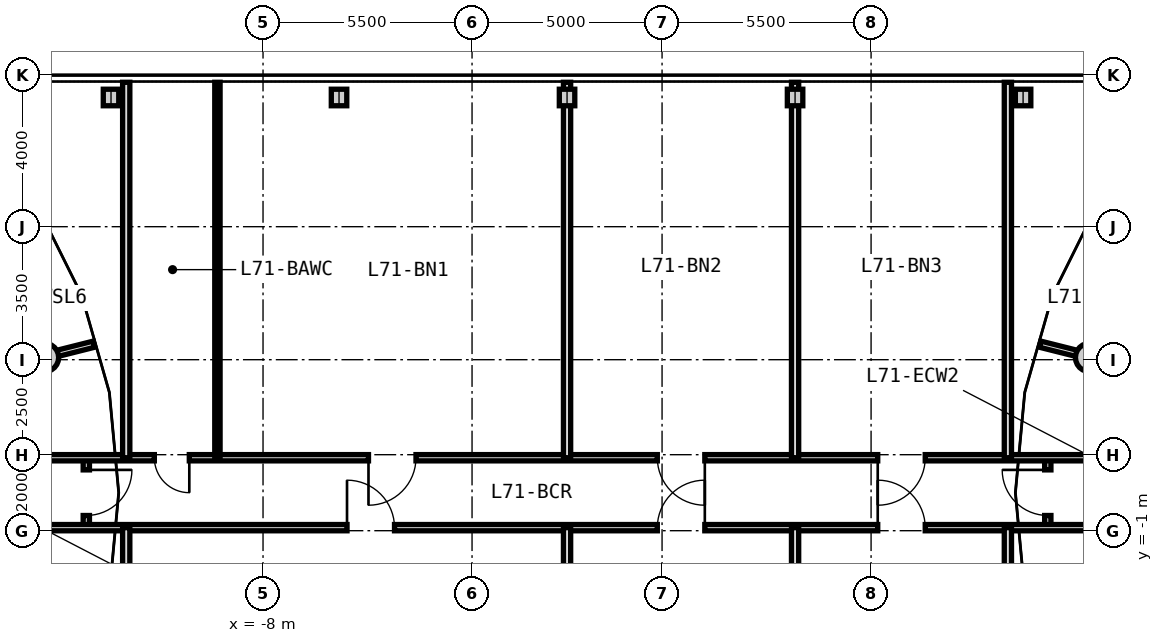
"""IFC4 building model, lengths in metres.
Left out: names, types, materials, properties, quantities, classifications, styles, units other than length and angle.
Written with IfcOpenShell. Run it as: python <this file> out.ifc"""

import sys

from ifc_helpers import new_model, si_unit, direction, frame, frame_2d, origin, origin_2d, place, context, subcontext, project, spatial, rectangle, circle, i_section, extrude, source, transform, mapped, element, fill, save


model = new_model("IFC4")
c1 = context("Model", 3, precision=1e-05, world=origin(), true_north=direction((0.0, 1.0)))
c2 = subcontext(c1, "Body", "Model", "MODEL_VIEW")
j1 = project(units=[si_unit("LENGTHUNIT", "METRE"), si_unit("PLANEANGLEUNIT", "RADIAN")], contexts=[c1])
p1 = place(None, origin())
s1 = spatial("IfcSite", under=j1, at=p1, CompositionType="ELEMENT")
p2 = place(p1, origin())
s2 = spatial("IfcBuilding", under=s1, at=p2, CompositionType="ELEMENT")
p3 = place(p2, frame((0.0, 0.0, 229.15)))
s3 = spatial("IfcBuildingStorey", under=s2, at=p3, CompositionType="ELEMENT", Elevation=229.15)
m1 = source(origin(), c2, "Body", "SweptSolid", [
    extrude(circle(Radius=0.375, at=origin_2d()), origin(), (0.0, 0.0, 1.0), 3.05),
])
for number, where, z_axis, x_axis in (
    (1, (-13.753, 3.559, 0.0), (0.0, 0.0, 1.0), (1.0, 0.0, 0.0)),
    (2, (13.753, 3.559, 0.0), (0.0, 0.0, 1.0), (1.0, 0.0, 0.0)),
):
    element("IfcColumn", number, at=place(p3, frame(where, z_axis=z_axis, x_axis=x_axis)), inside=s3, PredefinedType="COLUMN", context=c2, shape_type="MappedRepresentation", body=[
        mapped(m1, transform((0.0, 0.0, 0.0), x_axis=(1.0, 0.0, 0.0), y_axis=(0.0, 1.0, 0.0), z_axis=(0.0, 0.0, 1.0), scale=1.0)),
    ])
m2 = source(origin(), c2, "Body", "SweptSolid", [
    extrude(i_section(OverallWidth=0.407, OverallDepth=0.435, WebThickness=0.024, FlangeThickness=0.039, FilletRadius=0.015, at=origin_2d()), origin(), (0.0, 0.0, 1.0), 3.05),
])
for number, where, z_axis, x_axis in (
    (3, (-12.0, 10.4, 0.0), (0.0, 0.0, 1.0), (1.0, 0.0, 0.0)),
    (4, (-6.0, 10.4, 0.0), (0.0, 0.0, 1.0), (1.0, 0.0, 0.0)),
    (5, (0.0, 10.4, 0.0), (0.0, 0.0, 1.0), (1.0, 0.0, 0.0)),
    (6, (6.0, 10.4, 0.0), (0.0, 0.0, 1.0), (1.0, 0.0, 0.0)),
    (7, (12.0, 10.4, 0.0), (0.0, 0.0, 1.0), (1.0, 0.0, 0.0)),
):
    element("IfcColumn", number, at=place(p3, frame(where, z_axis=z_axis, x_axis=x_axis)), inside=s3, PredefinedType="COLUMN", context=c2, shape_type="MappedRepresentation", body=[
        mapped(m2, transform((0.0, 0.0, 0.0), x_axis=(1.0, 0.0, 0.0), y_axis=(0.0, 1.0, 0.0), z_axis=(0.0, 0.0, 1.0), scale=1.0)),
    ])
m3 = source(origin(), c2, "Body", "SweptSolid", [
    extrude(rectangle(XDim=6.157, YDim=0.165, at=frame_2d((3.079, 0.0))), origin(), (0.0, 0.0, 1.0), 2.395),
])
for number, where, z_axis, x_axis in (
    (8, (-18.42, 2.407, 0.0), (0.0, 0.0, 1.0), (0.97, 0.244, 0.0)),
    (9, (18.42, 2.407, 0.0), (0.0, 0.0, 1.0), (-0.97, 0.244, 0.0)),
):
    element("IfcWall", number, at=place(p3, frame(where, z_axis=z_axis, x_axis=x_axis)), inside=s3, PredefinedType="PARTITIONING", context=c2, shape_type="MappedRepresentation", body=[
        mapped(m3, transform((0.0, 0.0, 0.0), x_axis=(1.0, 0.0, 0.0), y_axis=(0.0, 1.0, 0.0), z_axis=(0.0, 0.0, 1.0), scale=1.0)),
    ])
m4 = source(origin(), c2, "Body", "SweptSolid", [
    extrude(rectangle(XDim=1.84, YDim=0.165, at=frame_2d((0.92, 0.0))), origin(), (0.0, 0.0, 1.0), 2.795),
])
p4 = place(p3, frame((-12.65, -0.92, 0.0), z_axis=(0.0, 0.0, 1.0), x_axis=(0.0, 1.0, 0.0)))
e10 = element("IfcWall", 10, at=p4, inside=s3, PredefinedType="PARTITIONING", context=c2, shape_type="MappedRepresentation", body=[
    mapped(m4, transform((0.0, 0.0, 0.0), x_axis=(1.0, 0.0, 0.0), y_axis=(0.0, 1.0, 0.0), z_axis=(0.0, 0.0, 1.0), scale=1.0)),
])
p5 = place(p4, frame((0.32, 0.0, 0.0)))
e11 = element("IfcOpeningElement", 11, at=p5, cuts=e10, PredefinedType="OPENING", context=c2, shape_type="SweptSolid", body=[
    extrude(rectangle(XDim=1.2, YDim=2.15, at=frame_2d((0.6, 1.075))), frame((0.0, 0.093, 0.0), z_axis=(0.0, -1.0, 0.0), x_axis=(1.0, 0.0, 0.0)), (0.0, 0.0, 1.0), 0.185),
])
p6 = place(p3, frame((12.65, -0.92, 0.0), z_axis=(0.0, 0.0, 1.0), x_axis=(0.0, 1.0, 0.0)))
e12 = element("IfcWall", 12, at=p6, inside=s3, PredefinedType="PARTITIONING", context=c2, shape_type="MappedRepresentation", body=[
    mapped(m4, transform((0.0, 0.0, 0.0), x_axis=(1.0, 0.0, 0.0), y_axis=(0.0, 1.0, 0.0), z_axis=(0.0, 0.0, 1.0), scale=1.0)),
])
p7 = place(p6, frame((0.32, 0.0, 0.0)))
e13 = element("IfcOpeningElement", 13, at=p7, cuts=e12, PredefinedType="OPENING", context=c2, shape_type="SweptSolid", body=[
    extrude(rectangle(XDim=1.2, YDim=2.15, at=frame_2d((0.6, 1.075))), frame((0.0, 0.093, 0.0), z_axis=(0.0, -1.0, 0.0), x_axis=(1.0, 0.0, 0.0)), (0.0, 0.0, 1.0), 0.185),
])
m5 = source(origin(), c2, "Body", "SweptSolid", [
    extrude(rectangle(XDim=37.0, YDim=0.165, at=frame_2d((18.5, 0.0))), origin(), (0.0, 0.0, 1.0), 2.795),
])
p8 = place(p3, frame((-18.5, -0.92, 0.0), z_axis=(0.0, 0.0, 1.0), x_axis=(1.0, 0.0, 0.0)))
e14 = element("IfcWall", 14, at=p8, inside=s3, PredefinedType="PARTITIONING", context=c2, shape_type="MappedRepresentation", body=[
    mapped(m5, transform((0.0, 0.0, 0.0), x_axis=(1.0, 0.0, 0.0), y_axis=(0.0, 1.0, 0.0), z_axis=(0.0, 0.0, 1.0), scale=1.0)),
])
p9 = place(p8, frame((2.662, 0.0, 0.0)))
e15 = element("IfcOpeningElement", 15, at=p9, cuts=e14, PredefinedType="OPENING", context=c2, shape_type="SweptSolid", body=[
    extrude(rectangle(XDim=0.95, YDim=2.1, at=frame_2d((0.475, 1.05))), frame((0.0, 0.093, 0.0), z_axis=(0.0, -1.0, 0.0), x_axis=(1.0, 0.0, 0.0)), (0.0, 0.0, 1.0), 0.185),
])
p10 = place(p8, frame((33.388, 0.0, 0.0)))
e16 = element("IfcOpeningElement", 16, at=p10, cuts=e14, PredefinedType="OPENING", context=c2, shape_type="SweptSolid", body=[
    extrude(rectangle(XDim=0.95, YDim=2.1, at=frame_2d((0.475, 1.05))), frame((0.0, 0.093, 0.0), z_axis=(0.0, -1.0, 0.0), x_axis=(1.0, 0.0, 0.0)), (0.0, 0.0, 1.0), 0.185),
])
p11 = place(p8, frame((12.71, 0.0, 0.0)))
e17 = element("IfcOpeningElement", 17, at=p11, cuts=e14, PredefinedType="OPENING", context=c2, shape_type="SweptSolid", body=[
    extrude(rectangle(XDim=1.25, YDim=2.2, at=frame_2d((0.625, 1.1))), frame((0.0, 0.093, 0.0), z_axis=(0.0, -1.0, 0.0), x_axis=(1.0, 0.0, 0.0)), (0.0, 0.0, 1.0), 0.185),
])
p12 = place(p8, frame((20.875, 0.0, 0.0)))
e18 = element("IfcOpeningElement", 18, at=p12, cuts=e14, PredefinedType="OPENING", context=c2, shape_type="SweptSolid", body=[
    extrude(rectangle(XDim=1.25, YDim=2.2, at=frame_2d((0.625, 1.1))), frame((0.0, 0.093, 0.0), z_axis=(0.0, -1.0, 0.0), x_axis=(1.0, 0.0, 0.0)), (0.0, 0.0, 1.0), 0.185),
])
p13 = place(p8, frame((26.675, 0.0, 0.0)))
e19 = element("IfcOpeningElement", 19, at=p13, cuts=e14, PredefinedType="OPENING", context=c2, shape_type="SweptSolid", body=[
    extrude(rectangle(XDim=1.25, YDim=2.2, at=frame_2d((0.625, 1.1))), frame((0.0, 0.093, 0.0), z_axis=(0.0, -1.0, 0.0), x_axis=(1.0, 0.0, 0.0)), (0.0, 0.0, 1.0), 0.185),
])
p14 = place(p3, frame((-18.5, 0.92, 0.0), z_axis=(0.0, 0.0, 1.0), x_axis=(1.0, 0.0, 0.0)))
e20 = element("IfcWall", 20, at=p14, inside=s3, PredefinedType="PARTITIONING", context=c2, shape_type="MappedRepresentation", body=[
    mapped(m5, transform((0.0, 0.0, 0.0), x_axis=(1.0, 0.0, 0.0), y_axis=(0.0, 1.0, 0.0), z_axis=(0.0, 0.0, 1.0), scale=1.0)),
])
p15 = place(p14, frame((2.662, 0.0, 0.0)))
e21 = element("IfcOpeningElement", 21, at=p15, cuts=e20, PredefinedType="OPENING", context=c2, shape_type="SweptSolid", body=[
    extrude(rectangle(XDim=0.95, YDim=2.1, at=frame_2d((0.475, 1.05))), frame((0.0, 0.093, 0.0), z_axis=(0.0, -1.0, 0.0), x_axis=(1.0, 0.0, 0.0)), (0.0, 0.0, 1.0), 0.185),
])
p16 = place(p14, frame((33.388, 0.0, 0.0)))
e22 = element("IfcOpeningElement", 22, at=p16, cuts=e20, PredefinedType="OPENING", context=c2, shape_type="SweptSolid", body=[
    extrude(rectangle(XDim=0.95, YDim=2.1, at=frame_2d((0.475, 1.05))), frame((0.0, 0.093, 0.0), z_axis=(0.0, -1.0, 0.0), x_axis=(1.0, 0.0, 0.0)), (0.0, 0.0, 1.0), 0.185),
])
p17 = place(p14, frame((7.64, 0.0, 0.0)))
e23 = element("IfcOpeningElement", 23, at=p17, cuts=e20, PredefinedType="OPENING", context=c2, shape_type="SweptSolid", body=[
    extrude(rectangle(XDim=0.92, YDim=2.1, at=frame_2d((0.46, 1.05))), frame((0.0, 0.093, 0.0), z_axis=(0.0, -1.0, 0.0), x_axis=(1.0, 0.0, 0.0)), (0.0, 0.0, 1.0), 0.185),
])
p18 = place(p14, frame((13.275, 0.0, 0.0)))
e24 = element("IfcOpeningElement", 24, at=p18, cuts=e20, PredefinedType="OPENING", context=c2, shape_type="SweptSolid", body=[
    extrude(rectangle(XDim=1.25, YDim=2.2, at=frame_2d((0.625, 1.1))), frame((0.0, 0.093, 0.0), z_axis=(0.0, -1.0, 0.0), x_axis=(1.0, 0.0, 0.0)), (0.0, 0.0, 1.0), 0.185),
])
p19 = place(p14, frame((20.875, 0.0, 0.0)))
e25 = element("IfcOpeningElement", 25, at=p19, cuts=e20, PredefinedType="OPENING", context=c2, shape_type="SweptSolid", body=[
    extrude(rectangle(XDim=1.25, YDim=2.2, at=frame_2d((0.625, 1.1))), frame((0.0, 0.093, 0.0), z_axis=(0.0, -1.0, 0.0), x_axis=(1.0, 0.0, 0.0)), (0.0, 0.0, 1.0), 0.185),
])
p20 = place(p14, frame((26.675, 0.0, 0.0)))
e26 = element("IfcOpeningElement", 26, at=p20, cuts=e20, PredefinedType="OPENING", context=c2, shape_type="SweptSolid", body=[
    extrude(rectangle(XDim=1.25, YDim=2.2, at=frame_2d((0.625, 1.1))), frame((0.0, 0.093, 0.0), z_axis=(0.0, -1.0, 0.0), x_axis=(1.0, 0.0, 0.0)), (0.0, 0.0, 1.0), 0.185),
])
m6 = source(origin(), c2, "Body", "SweptSolid", [
    extrude(rectangle(XDim=9.88, YDim=0.19, at=frame_2d((4.94, 0.0))), origin(), (0.0, 0.0, 1.0), 2.795),
])
for number, where, z_axis, x_axis in (
    (27, (-11.6, -10.8, 0.0), (0.0, 0.0, 1.0), (0.0, 1.0, 0.0)),
    (28, (-11.6, 0.92, 0.0), (0.0, 0.0, 1.0), (0.0, 1.0, 0.0)),
    (29, (11.6, -10.8, 0.0), (0.0, 0.0, 1.0), (0.0, 1.0, 0.0)),
    (30, (11.6, 0.92, 0.0), (0.0, 0.0, 1.0), (0.0, 1.0, 0.0)),
):
    element("IfcWall", number, at=place(p3, frame(where, z_axis=z_axis, x_axis=x_axis)), inside=s3, PredefinedType="PARTITIONING", context=c2, shape_type="MappedRepresentation", body=[
        mapped(m6, transform((0.0, 0.0, 0.0), x_axis=(1.0, 0.0, 0.0), y_axis=(0.0, 1.0, 0.0), z_axis=(0.0, 0.0, 1.0), scale=1.0)),
    ])
m7 = source(origin(), c2, "Body", "SweptSolid", [
    extrude(rectangle(XDim=9.88, YDim=0.19, at=frame_2d((4.94, 0.0))), origin(), (0.0, 0.0, 1.0), 2.095),
])
for number, where, z_axis, x_axis in (
    (31, (0.0, -10.8, 0.0), (0.0, 0.0, 1.0), (0.0, 1.0, 0.0)),
    (32, (0.0, 0.92, 0.0), (0.0, 0.0, 1.0), (0.0, 1.0, 0.0)),
):
    element("IfcWall", number, at=place(p3, frame(where, z_axis=z_axis, x_axis=x_axis)), inside=s3, PredefinedType="PARTITIONING", context=c2, shape_type="MappedRepresentation", body=[
        mapped(m7, transform((0.0, 0.0, 0.0), x_axis=(1.0, 0.0, 0.0), y_axis=(0.0, 1.0, 0.0), z_axis=(0.0, 0.0, 1.0), scale=1.0)),
    ])
m8 = source(origin(), c2, "Body", "SweptSolid", [
    extrude(rectangle(XDim=9.88, YDim=0.14, at=frame_2d((4.94, 0.0))), origin(), (0.0, 0.0, 1.0), 2.795),
])
p21 = place(p3, frame((-9.2, 0.92, 0.0), z_axis=(0.0, 0.0, 1.0), x_axis=(0.0, 1.0, 0.0)))
e33 = element("IfcWall", 33, at=p21, inside=s3, PredefinedType="PARTITIONING", context=c2, shape_type="MappedRepresentation", body=[
    mapped(m8, transform((0.0, 0.0, 0.0), x_axis=(1.0, 0.0, 0.0), y_axis=(0.0, 1.0, 0.0), z_axis=(0.0, 0.0, 1.0), scale=1.0)),
])
for number, where, z_axis, x_axis in (
    (34, (6.0, -10.8, 0.0), (0.0, 0.0, 1.0), (0.0, 1.0, 0.0)),
    (35, (6.0, 0.92, 0.0), (0.0, 0.0, 1.0), (0.0, 1.0, 0.0)),
):
    element("IfcWall", number, at=place(p3, frame(where, z_axis=z_axis, x_axis=x_axis)), inside=s3, PredefinedType="PARTITIONING", context=c2, shape_type="MappedRepresentation", body=[
        mapped(m7, transform((0.0, 0.0, 0.0), x_axis=(1.0, 0.0, 0.0), y_axis=(0.0, 1.0, 0.0), z_axis=(0.0, 0.0, 1.0), scale=1.0)),
    ])
m9 = source(origin(), c2, "Body", "SweptSolid", [
    extrude(rectangle(XDim=1.2, YDim=2.15, at=frame_2d((0.6, 1.075))), frame((0.0, 0.025, 0.0), z_axis=(0.0, -1.0, 0.0), x_axis=(1.0, 0.0, 0.0)), (0.0, 0.0, 1.0), 0.05),
])
p22 = place(p5, frame((1.2, 0.0, 0.0), z_axis=(0.0, 0.0, 1.0), x_axis=(-1.0, 0.0, 0.0)))
e36 = element("IfcDoor", 36, at=p22, inside=s3, OperationType="SINGLE_SWING_LEFT", PredefinedType="DOOR", context=c2, shape_type="MappedRepresentation", body=[
    mapped(m9, transform((0.0, 0.0, 0.0), x_axis=(1.0, 0.0, 0.0), y_axis=(0.0, 1.0, 0.0), z_axis=(0.0, 0.0, 1.0), scale=1.0)),
])
fill(e11, e36)
p23 = place(p7, origin())
e37 = element("IfcDoor", 37, at=p23, inside=s3, OperationType="SINGLE_SWING_RIGHT", PredefinedType="DOOR", context=c2, shape_type="MappedRepresentation", body=[
    mapped(m9, transform((0.0, 0.0, 0.0), x_axis=(1.0, 0.0, 0.0), y_axis=(0.0, 1.0, 0.0), z_axis=(0.0, 0.0, 1.0), scale=1.0)),
])
fill(e13, e37)
m10 = source(origin(), c2, "Body", "SweptSolid", [
    extrude(rectangle(XDim=1.25, YDim=2.2, at=frame_2d((0.625, 1.1))), frame((0.0, 0.025, 0.0), z_axis=(0.0, -1.0, 0.0), x_axis=(1.0, 0.0, 0.0)), (0.0, 0.0, 1.0), 0.05),
])
p24 = place(p11, origin())
e38 = element("IfcDoor", 38, at=p24, inside=s3, OperationType="SINGLE_SWING_LEFT", PredefinedType="DOOR", context=c2, shape_type="MappedRepresentation", body=[
    mapped(m10, transform((0.0, 0.0, 0.0), x_axis=(1.0, 0.0, 0.0), y_axis=(0.0, 1.0, 0.0), z_axis=(0.0, 0.0, 1.0), scale=1.0)),
])
fill(e17, e38)
m11 = source(origin(), c2, "Body", "SweptSolid", [
    extrude(rectangle(XDim=0.92, YDim=2.1, at=frame_2d((0.46, 1.05))), frame((0.0, 0.025, 0.0), z_axis=(0.0, -1.0, 0.0), x_axis=(1.0, 0.0, 0.0)), (0.0, 0.0, 1.0), 0.05),
])
p25 = place(p17, frame((0.92, 0.0, 0.0), z_axis=(0.0, 0.0, 1.0), x_axis=(-1.0, 0.0, 0.0)))
e39 = element("IfcDoor", 39, at=p25, inside=s3, OperationType="SINGLE_SWING_LEFT", PredefinedType="DOOR", context=c2, shape_type="MappedRepresentation", body=[
    mapped(m11, transform((0.0, 0.0, 0.0), x_axis=(1.0, 0.0, 0.0), y_axis=(0.0, 1.0, 0.0), z_axis=(0.0, 0.0, 1.0), scale=1.0)),
])
fill(e23, e39)
p26 = place(p18, frame((1.25, 0.0, 0.0), z_axis=(0.0, 0.0, 1.0), x_axis=(-1.0, 0.0, 0.0)))
e40 = element("IfcDoor", 40, at=p26, inside=s3, OperationType="SINGLE_SWING_RIGHT", PredefinedType="DOOR", context=c2, shape_type="MappedRepresentation", body=[
    mapped(m10, transform((0.0, 0.0, 0.0), x_axis=(1.0, 0.0, 0.0), y_axis=(0.0, 1.0, 0.0), z_axis=(0.0, 0.0, 1.0), scale=1.0)),
])
fill(e24, e40)
p27 = place(p12, origin())
e41 = element("IfcDoor", 41, at=p27, inside=s3, OperationType="SINGLE_SWING_RIGHT", PredefinedType="DOOR", context=c2, shape_type="MappedRepresentation", body=[
    mapped(m10, transform((0.0, 0.0, 0.0), x_axis=(1.0, 0.0, 0.0), y_axis=(0.0, 1.0, 0.0), z_axis=(0.0, 0.0, 1.0), scale=1.0)),
])
fill(e18, e41)
p28 = place(p19, frame((1.25, 0.0, 0.0), z_axis=(0.0, 0.0, 1.0), x_axis=(-1.0, 0.0, 0.0)))
e42 = element("IfcDoor", 42, at=p28, inside=s3, OperationType="SINGLE_SWING_LEFT", PredefinedType="DOOR", context=c2, shape_type="MappedRepresentation", body=[
    mapped(m10, transform((0.0, 0.0, 0.0), x_axis=(1.0, 0.0, 0.0), y_axis=(0.0, 1.0, 0.0), z_axis=(0.0, 0.0, 1.0), scale=1.0)),
])
fill(e25, e42)
p29 = place(p13, origin())
e43 = element("IfcDoor", 43, at=p29, inside=s3, OperationType="SINGLE_SWING_LEFT", PredefinedType="DOOR", context=c2, shape_type="MappedRepresentation", body=[
    mapped(m10, transform((0.0, 0.0, 0.0), x_axis=(1.0, 0.0, 0.0), y_axis=(0.0, 1.0, 0.0), z_axis=(0.0, 0.0, 1.0), scale=1.0)),
])
fill(e19, e43)
p30 = place(p20, frame((1.25, 0.0, 0.0), z_axis=(0.0, 0.0, 1.0), x_axis=(-1.0, 0.0, 0.0)))
e44 = element("IfcDoor", 44, at=p30, inside=s3, OperationType="SINGLE_SWING_RIGHT", PredefinedType="DOOR", context=c2, shape_type="MappedRepresentation", body=[
    mapped(m10, transform((0.0, 0.0, 0.0), x_axis=(1.0, 0.0, 0.0), y_axis=(0.0, 1.0, 0.0), z_axis=(0.0, 0.0, 1.0), scale=1.0)),
])
fill(e26, e44)
save(model, sys.argv[1])
